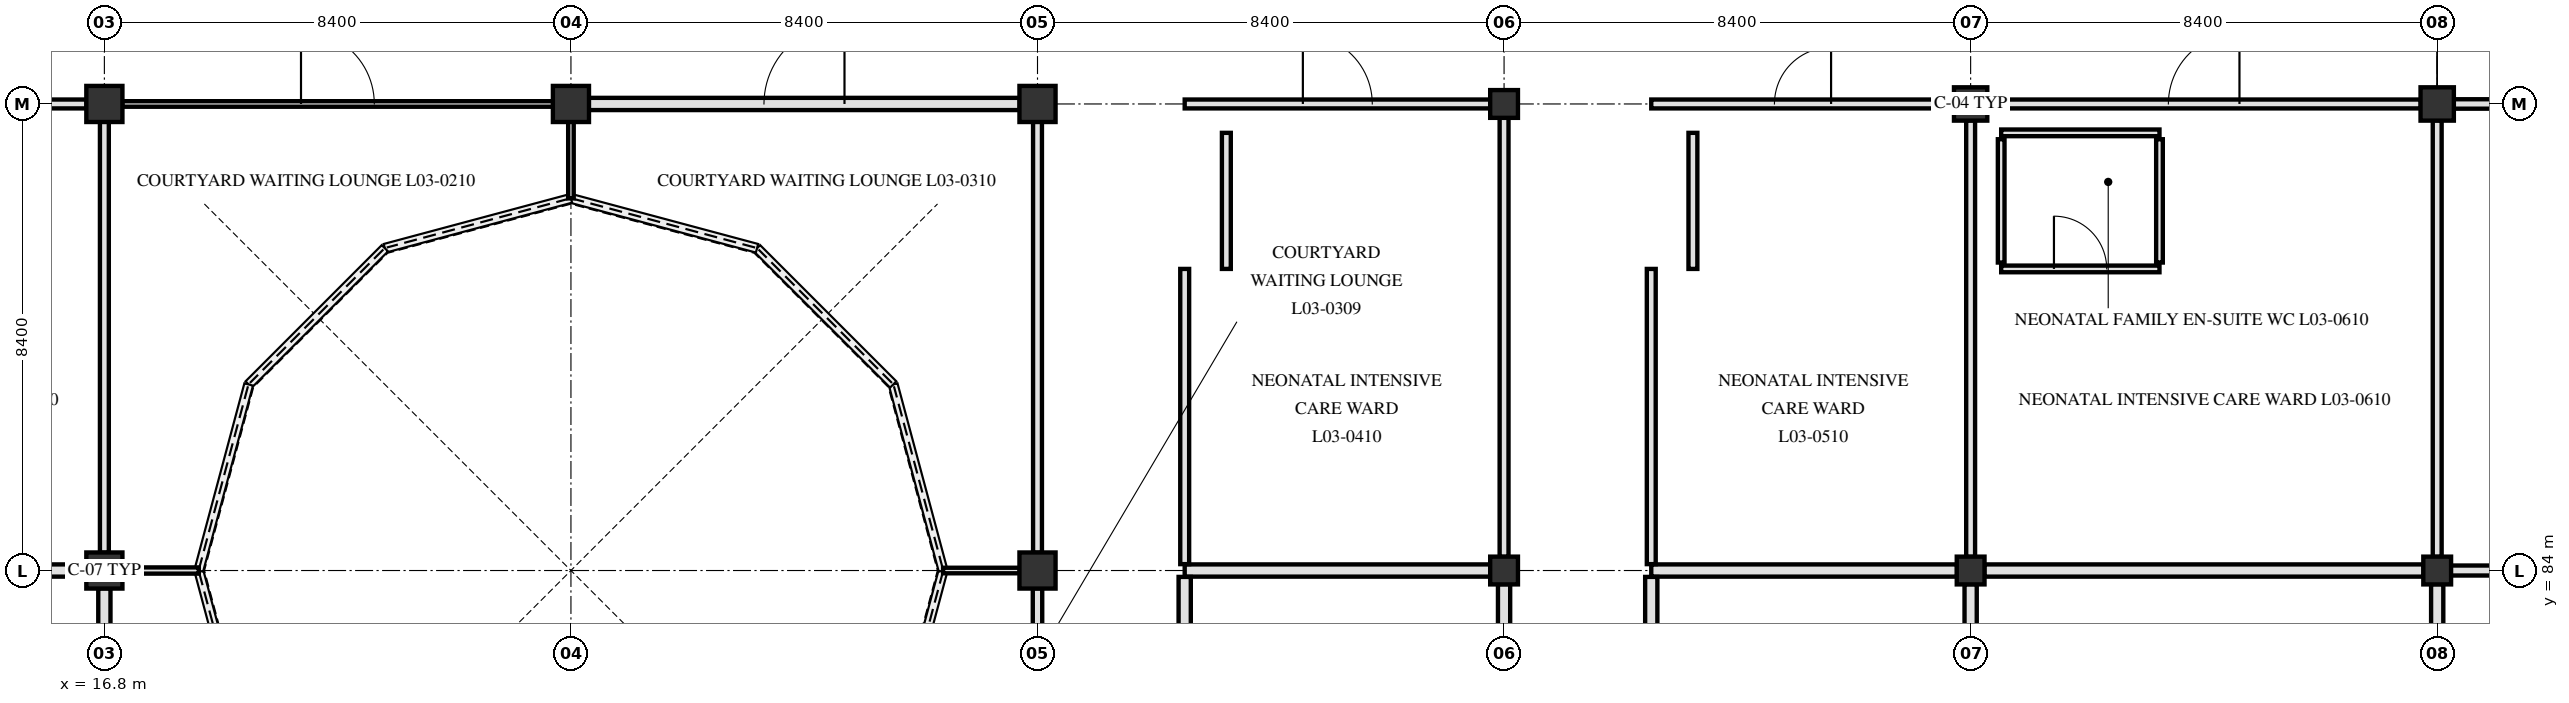
"""IFC4 building model, lengths in metres.
Left out: names, types, materials, properties, quantities, classifications, styles, units other than length and angle.
Written with IfcOpenShell. Run it as: python <this file> out.ifc"""

import sys

from ifc_helpers import new_model, si_unit, direction, frame, frame_2d, origin, origin_2d, place, context, subcontext, project, spatial, rectangle, circle, extrude, element, fill, save


model = new_model("IFC4")
c1 = context("Model", 3, precision=1e-05, world=origin(), true_north=direction((0.0, 1.0)))
c2 = subcontext(c1, "Body", "Model", "MODEL_VIEW")
j1 = project(units=[si_unit("LENGTHUNIT", "METRE"), si_unit("PLANEANGLEUNIT", "RADIAN")], contexts=[c1])
p1 = place(None, origin())
s1 = spatial("IfcSite", under=j1, at=p1, CompositionType="ELEMENT")
p2 = place(p1, origin())
s2 = spatial("IfcBuilding", under=s1, at=p2, CompositionType="ELEMENT")
p3 = place(p2, frame((0.0, 0.0, 14.4)))
s3 = spatial("IfcBuildingStorey", under=s2, at=p3, CompositionType="ELEMENT", Elevation=14.4)
for number, where, z_axis, x_axis in (
    (1, (16.8, 84.0, 0.0), (0.0, 0.0, 1.0), (1.0, 0.0, 0.0)),
    (2, (16.8, 92.4, 0.0), (0.0, 0.0, 1.0), (1.0, 0.0, 0.0)),
    (3, (25.2, 92.4, 0.0), (0.0, 0.0, 1.0), (1.0, 0.0, 0.0)),
    (4, (33.6, 84.0, 0.0), (0.0, 0.0, 1.0), (1.0, 0.0, 0.0)),
    (5, (33.6, 92.4, 0.0), (0.0, 0.0, 1.0), (1.0, 0.0, 0.0)),
):
    element("IfcColumn", number, at=place(p3, frame(where, z_axis=z_axis, x_axis=x_axis)), inside=s3, PredefinedType="COLUMN", context=c2, shape_type="SweptSolid", body=[
        extrude(circle(Radius=0.325, at=origin_2d()), origin(), (0.0, 0.0, 1.0), 4.2),
    ])
for number, where, z_axis, x_axis in (
    (6, (42.0, 84.0, 0.0), (0.0, 0.0, 1.0), (1.0, 0.0, 0.0)),
    (7, (42.0, 92.4, 0.0), (0.0, 0.0, 1.0), (1.0, 0.0, 0.0)),
    (8, (50.4, 84.0, 0.0), (0.0, 0.0, 1.0), (1.0, 0.0, 0.0)),
):
    element("IfcColumn", number, at=place(p3, frame(where, z_axis=z_axis, x_axis=x_axis)), inside=s3, PredefinedType="COLUMN", context=c2, shape_type="SweptSolid", body=[
        extrude(rectangle(XDim=0.5, YDim=0.5, at=origin_2d()), origin(), (0.0, 0.0, 1.0), 4.2),
    ])
p4 = place(p3, frame((50.4, 92.4, 0.0), z_axis=(0.0, 0.0, 1.0), x_axis=(1.0, 0.0, 0.0)))
e9 = element("IfcColumn", 9, at=p4, inside=s3, PredefinedType="COLUMN", context=c2, shape_type="SweptSolid", body=[
    extrude(rectangle(XDim=0.6, YDim=0.6, at=origin_2d()), origin(), (0.0, 0.0, 1.0), 4.2),
])
p5 = place(p3, frame((58.8, 84.0, 0.0), z_axis=(0.0, 0.0, 1.0), x_axis=(1.0, 0.0, 0.0)))
e10 = element("IfcColumn", 10, at=p5, inside=s3, PredefinedType="COLUMN", context=c2, shape_type="SweptSolid", body=[
    extrude(rectangle(XDim=0.5, YDim=0.5, at=origin_2d()), origin(), (0.0, 0.0, 1.0), 4.2),
])
p6 = place(p3, frame((58.8, 92.4, 0.0), z_axis=(0.0, 0.0, 1.0), x_axis=(1.0, 0.0, 0.0)))
e11 = element("IfcColumn", 11, at=p6, inside=s3, PredefinedType="COLUMN", context=c2, shape_type="SweptSolid", body=[
    extrude(rectangle(XDim=0.6, YDim=0.6, at=origin_2d()), origin(), (0.0, 0.0, 1.0), 4.2),
])
p7 = place(p3, frame((8.645, 84.0, 0.0), z_axis=(0.0, 0.0, 1.0), x_axis=(1.0, 0.0, 0.0)))
e12 = element("IfcWall", 12, at=p7, inside=s3, PredefinedType="PARTITIONING", context=c2, shape_type="SweptSolid", body=[
    extrude(rectangle(XDim=7.835, YDim=0.22, at=frame_2d((3.917, 0.0))), origin(), (0.0, 0.0, 1.0), 3.28),
])
p8 = place(p3, frame((17.12, 84.0, 0.0), z_axis=(0.0, 0.0, 1.0), x_axis=(1.0, 0.0, 0.0)))
e13 = element("IfcWall", 13, at=p8, inside=s3, PredefinedType="PARTITIONING", context=c2, shape_type="SweptSolid", body=[
    extrude(rectangle(XDim=1.38, YDim=0.112, at=frame_2d((0.69, 0.0))), origin(), (0.0, 0.0, 1.0), 3.89),
])
p9 = place(p3, frame((31.9, 84.0, 0.0), z_axis=(0.0, 0.0, 1.0), x_axis=(1.0, 0.0, 0.0)))
e14 = element("IfcWall", 14, at=p9, inside=s3, PredefinedType="PARTITIONING", context=c2, shape_type="SweptSolid", body=[
    extrude(rectangle(XDim=1.38, YDim=0.1, at=frame_2d((0.69, 0.0))), origin(), (0.0, 0.0, 1.0), 3.89),
])
p10 = place(p3, frame((36.25, 84.0, 0.0), z_axis=(0.0, 0.0, 1.0), x_axis=(1.0, 0.0, 0.0)))
e15 = element("IfcWall", 15, at=p10, inside=s3, PredefinedType="PARTITIONING", context=c2, shape_type="SweptSolid", body=[
    extrude(rectangle(XDim=5.505, YDim=0.22, at=frame_2d((2.752, 0.0))), origin(), (0.0, 0.0, 1.0), 3.28),
])
p11 = place(p3, frame((44.65, 84.0, 0.0), z_axis=(0.0, 0.0, 1.0), x_axis=(1.0, 0.0, 0.0)))
e16 = element("IfcWall", 16, at=p11, inside=s3, PredefinedType="PARTITIONING", context=c2, shape_type="SweptSolid", body=[
    extrude(rectangle(XDim=5.505, YDim=0.22, at=frame_2d((2.752, 0.0))), origin(), (0.0, 0.0, 1.0), 3.28),
])
p12 = place(p3, frame((50.645, 84.0, 0.0), z_axis=(0.0, 0.0, 1.0), x_axis=(1.0, 0.0, 0.0)))
e17 = element("IfcWall", 17, at=p12, inside=s3, PredefinedType="PARTITIONING", context=c2, shape_type="SweptSolid", body=[
    extrude(rectangle(XDim=7.91, YDim=0.22, at=frame_2d((3.955, 0.0))), origin(), (0.0, 0.0, 1.0), 3.28),
])
p13 = place(p3, frame((59.045, 84.0, 0.0), z_axis=(0.0, 0.0, 1.0), x_axis=(1.0, 0.0, 0.0)))
e18 = element("IfcWall", 18, at=p13, inside=s3, PredefinedType="PARTITIONING", context=c2, shape_type="SweptSolid", body=[
    extrude(rectangle(XDim=7.91, YDim=0.18, at=frame_2d((3.955, 0.0))), origin(), (0.0, 0.0, 1.0), 3.28),
])
p14 = place(p3, frame((50.95, 89.43, 0.0), z_axis=(0.0, 0.0, 1.0), x_axis=(1.0, 0.0, 0.0)))
e19 = element("IfcWall", 19, at=p14, inside=s3, PredefinedType="PARTITIONING", context=c2, shape_type="SweptSolid", body=[
    extrude(rectangle(XDim=2.85, YDim=0.12, at=frame_2d((1.425, 0.0))), origin(), (0.0, 0.0, 1.0), 3.89),
])
p15 = place(p14, frame((0.95, 0.0, 0.0)))
e20 = element("IfcOpeningElement", 20, at=p15, cuts=e19, PredefinedType="OPENING", context=c2, shape_type="SweptSolid", body=[
    extrude(rectangle(XDim=0.95, YDim=2.1, at=frame_2d((0.475, 1.05))), frame((0.0, 0.07, 0.0), z_axis=(0.0, -1.0, 0.0), x_axis=(1.0, 0.0, 0.0)), (0.0, 0.0, 1.0), 0.14),
])
p16 = place(p3, frame((50.95, 91.88, 0.0), z_axis=(0.0, 0.0, 1.0), x_axis=(1.0, 0.0, 0.0)))
e21 = element("IfcWall", 21, at=p16, inside=s3, PredefinedType="PARTITIONING", context=c2, shape_type="SweptSolid", body=[
    extrude(rectangle(XDim=2.85, YDim=0.12, at=frame_2d((1.425, 0.0))), origin(), (0.0, 0.0, 1.0), 3.89),
])
p17 = place(p3, frame((8.645, 92.4, 0.0), z_axis=(0.0, 0.0, 1.0), x_axis=(1.0, 0.0, 0.0)))
e22 = element("IfcWall", 22, at=p17, inside=s3, PredefinedType="PARTITIONING", context=c2, shape_type="SweptSolid", body=[
    extrude(rectangle(XDim=7.835, YDim=0.16, at=frame_2d((3.917, 0.0))), origin(), (0.0, 0.0, 1.0), 3.28),
])
p18 = place(p17, frame((3.317, 0.0, 0.0)))
e23 = element("IfcOpeningElement", 23, at=p18, cuts=e22, PredefinedType="OPENING", context=c2, shape_type="SweptSolid", body=[
    extrude(rectangle(XDim=1.2, YDim=2.15, at=frame_2d((0.6, 1.075))), frame((0.0, 0.09, 0.0), z_axis=(0.0, -1.0, 0.0), x_axis=(1.0, 0.0, 0.0)), (0.0, 0.0, 1.0), 0.18),
])
p19 = place(p3, frame((17.12, 92.4, 0.0), z_axis=(0.0, 0.0, 1.0), x_axis=(1.0, 0.0, 0.0)))
e24 = element("IfcWall", 24, at=p19, inside=s3, PredefinedType="PARTITIONING", context=c2, shape_type="SweptSolid", body=[
    extrude(rectangle(XDim=7.76, YDim=0.1, at=frame_2d((3.88, 0.0))), origin(), (0.0, 0.0, 1.0), 3.28),
])
p20 = place(p19, frame((3.22, 0.0, 0.0)))
e25 = element("IfcOpeningElement", 25, at=p20, cuts=e24, PredefinedType="OPENING", context=c2, shape_type="SweptSolid", body=[
    extrude(rectangle(XDim=1.32, YDim=2.18, at=frame_2d((0.66, 1.09))), frame((0.0, 0.06, 0.0), z_axis=(0.0, -1.0, 0.0), x_axis=(1.0, 0.0, 0.0)), (0.0, 0.0, 1.0), 0.12),
])
p21 = place(p3, frame((25.52, 92.4, 0.0), z_axis=(0.0, 0.0, 1.0), x_axis=(1.0, 0.0, 0.0)))
e26 = element("IfcWall", 26, at=p21, inside=s3, PredefinedType="PARTITIONING", context=c2, shape_type="SweptSolid", body=[
    extrude(rectangle(XDim=7.76, YDim=0.22, at=frame_2d((3.88, 0.0))), origin(), (0.0, 0.0, 1.0), 3.28),
])
p22 = place(p21, frame((3.155, 0.0, 0.0)))
e27 = element("IfcOpeningElement", 27, at=p22, cuts=e26, PredefinedType="OPENING", context=c2, shape_type="SweptSolid", body=[
    extrude(rectangle(XDim=1.45, YDim=2.2, at=frame_2d((0.725, 1.1))), frame((0.0, 0.12, 0.0), z_axis=(0.0, -1.0, 0.0), x_axis=(1.0, 0.0, 0.0)), (0.0, 0.0, 1.0), 0.24),
])
p23 = place(p3, frame((36.25, 92.4, 0.0), z_axis=(0.0, 0.0, 1.0), x_axis=(1.0, 0.0, 0.0)))
e28 = element("IfcWall", 28, at=p23, inside=s3, PredefinedType="PARTITIONING", context=c2, shape_type="SweptSolid", body=[
    extrude(rectangle(XDim=5.505, YDim=0.16, at=frame_2d((2.752, 0.0))), origin(), (0.0, 0.0, 1.0), 3.28),
])
p24 = place(p23, frame((2.127, 0.0, 0.0)))
e29 = element("IfcOpeningElement", 29, at=p24, cuts=e28, PredefinedType="OPENING", context=c2, shape_type="SweptSolid", body=[
    extrude(rectangle(XDim=1.25, YDim=2.2, at=frame_2d((0.625, 1.1))), frame((0.0, 0.09, 0.0), z_axis=(0.0, -1.0, 0.0), x_axis=(1.0, 0.0, 0.0)), (0.0, 0.0, 1.0), 0.18),
])
p25 = place(p3, frame((44.65, 92.4, 0.0), z_axis=(0.0, 0.0, 1.0), x_axis=(1.0, 0.0, 0.0)))
e30 = element("IfcWall", 30, at=p25, inside=s3, PredefinedType="PARTITIONING", context=c2, shape_type="SweptSolid", body=[
    extrude(rectangle(XDim=5.455, YDim=0.16, at=frame_2d((2.728, 0.0))), origin(), (0.0, 0.0, 1.0), 3.28),
])
p26 = place(p25, frame((2.218, 0.0, 0.0)))
e31 = element("IfcOpeningElement", 31, at=p26, cuts=e30, PredefinedType="OPENING", context=c2, shape_type="SweptSolid", body=[
    extrude(rectangle(XDim=1.02, YDim=2.12, at=frame_2d((0.51, 1.06))), frame((0.0, 0.09, 0.0), z_axis=(0.0, -1.0, 0.0), x_axis=(1.0, 0.0, 0.0)), (0.0, 0.0, 1.0), 0.18),
])
p27 = place(p3, frame((50.695, 92.4, 0.0), z_axis=(0.0, 0.0, 1.0), x_axis=(1.0, 0.0, 0.0)))
e32 = element("IfcWall", 32, at=p27, inside=s3, PredefinedType="PARTITIONING", context=c2, shape_type="SweptSolid", body=[
    extrude(rectangle(XDim=7.81, YDim=0.16, at=frame_2d((3.905, 0.0))), origin(), (0.0, 0.0, 1.0), 2.88),
])
p28 = place(p27, frame((3.265, 0.0, 0.0)))
e33 = element("IfcOpeningElement", 33, at=p28, cuts=e32, PredefinedType="OPENING", context=c2, shape_type="SweptSolid", body=[
    extrude(rectangle(XDim=1.28, YDim=2.18, at=frame_2d((0.64, 1.09))), frame((0.0, 0.09, 0.0), z_axis=(0.0, -1.0, 0.0), x_axis=(1.0, 0.0, 0.0)), (0.0, 0.0, 1.0), 0.18),
])
p29 = place(p3, frame((59.095, 92.4, 0.0), z_axis=(0.0, 0.0, 1.0), x_axis=(1.0, 0.0, 0.0)))
e34 = element("IfcWall", 34, at=p29, inside=s3, PredefinedType="PARTITIONING", context=c2, shape_type="SweptSolid", body=[
    extrude(rectangle(XDim=7.76, YDim=0.17, at=frame_2d((3.88, 0.0))), origin(), (0.0, 0.0, 1.0), 2.88),
])
p30 = place(p29, frame((2.98, 0.0, 0.0)))
e35 = element("IfcOpeningElement", 35, at=p30, cuts=e34, PredefinedType="OPENING", context=c2, shape_type="SweptSolid", body=[
    extrude(rectangle(XDim=1.8, YDim=2.25, at=frame_2d((0.9, 1.125))), frame((0.0, 0.095, 0.0), z_axis=(0.0, -1.0, 0.0), x_axis=(1.0, 0.0, 0.0)), (0.0, 0.0, 1.0), 0.19),
])
p31 = place(p3, frame((16.8, 78.315, 0.0), z_axis=(0.0, 0.0, 1.0), x_axis=(0.0, 1.0, 0.0)))
e36 = element("IfcWall", 36, at=p31, inside=s3, PredefinedType="PARTITIONING", context=c2, shape_type="SweptSolid", body=[
    extrude(rectangle(XDim=5.365, YDim=0.22, at=frame_2d((2.683, 0.0))), origin(), (0.0, 0.0, 1.0), 3.33),
])
p32 = place(p3, frame((16.8, 84.32, 0.0), z_axis=(0.0, 0.0, 1.0), x_axis=(0.0, 1.0, 0.0)))
e37 = element("IfcWall", 37, at=p32, inside=s3, PredefinedType="PARTITIONING", context=c2, shape_type="SweptSolid", body=[
    extrude(rectangle(XDim=7.76, YDim=0.16, at=frame_2d((3.88, 0.0))), origin(), (0.0, 0.0, 1.0), 3.33),
])
p33 = place(p3, frame((25.2, 90.7, 0.0), z_axis=(0.0, 0.0, 1.0), x_axis=(0.0, 1.0, 0.0)))
e38 = element("IfcWall", 38, at=p33, inside=s3, PredefinedType="PARTITIONING", context=c2, shape_type="SweptSolid", body=[
    extrude(rectangle(XDim=1.38, YDim=0.1, at=frame_2d((0.69, 0.0))), origin(), (0.0, 0.0, 1.0), 3.89),
])
p34 = place(p3, frame((33.6, 78.315, 0.0), z_axis=(0.0, 0.0, 1.0), x_axis=(0.0, 1.0, 0.0)))
e39 = element("IfcWall", 39, at=p34, inside=s3, PredefinedType="PARTITIONING", context=c2, shape_type="SweptSolid", body=[
    extrude(rectangle(XDim=5.365, YDim=0.17, at=frame_2d((2.683, 0.0))), origin(), (0.0, 0.0, 1.0), 3.33),
])
p35 = place(p3, frame((33.6, 84.32, 0.0), z_axis=(0.0, 0.0, 1.0), x_axis=(0.0, 1.0, 0.0)))
e40 = element("IfcWall", 40, at=p35, inside=s3, PredefinedType="PARTITIONING", context=c2, shape_type="SweptSolid", body=[
    extrude(rectangle(XDim=7.76, YDim=0.16, at=frame_2d((3.88, 0.0))), origin(), (0.0, 0.0, 1.0), 3.33),
])
p36 = place(p3, frame((36.25, 78.315, 0.0), z_axis=(0.0, 0.0, 1.0), x_axis=(0.0, 1.0, 0.0)))
e41 = element("IfcWall", 41, at=p36, inside=s3, PredefinedType="PARTITIONING", context=c2, shape_type="SweptSolid", body=[
    extrude(rectangle(XDim=5.57, YDim=0.22, at=frame_2d((2.785, 0.0))), origin(), (0.0, 0.0, 1.0), 3.28),
])
p37 = place(p3, frame((36.25, 84.115, 0.0), z_axis=(0.0, 0.0, 1.0), x_axis=(0.0, 1.0, 0.0)))
e42 = element("IfcWall", 42, at=p37, inside=s3, PredefinedType="PARTITIONING", context=c2, shape_type="SweptSolid", body=[
    extrude(rectangle(XDim=5.315, YDim=0.16, at=frame_2d((2.657, 0.0))), origin(), (0.0, 0.0, 1.0), 3.28),
])
p38 = place(p3, frame((37.0, 89.43, 0.0), z_axis=(0.0, 0.0, 1.0), x_axis=(0.0, 1.0, 0.0)))
e43 = element("IfcWall", 43, at=p38, inside=s3, PredefinedType="PARTITIONING", context=c2, shape_type="SweptSolid", body=[
    extrude(rectangle(XDim=2.45, YDim=0.16, at=frame_2d((1.225, 0.0))), origin(), (0.0, 0.0, 1.0), 3.89),
])
p39 = place(p3, frame((42.0, 78.315, 0.0), z_axis=(0.0, 0.0, 1.0), x_axis=(0.0, 1.0, 0.0)))
e44 = element("IfcWall", 44, at=p39, inside=s3, PredefinedType="PARTITIONING", context=c2, shape_type="SweptSolid", body=[
    extrude(rectangle(XDim=5.44, YDim=0.22, at=frame_2d((2.72, 0.0))), origin(), (0.0, 0.0, 1.0), 3.33),
])
p40 = place(p3, frame((42.0, 84.245, 0.0), z_axis=(0.0, 0.0, 1.0), x_axis=(0.0, 1.0, 0.0)))
e45 = element("IfcWall", 45, at=p40, inside=s3, PredefinedType="PARTITIONING", context=c2, shape_type="SweptSolid", body=[
    extrude(rectangle(XDim=7.91, YDim=0.16, at=frame_2d((3.955, 0.0))), origin(), (0.0, 0.0, 1.0), 3.33),
])
p41 = place(p3, frame((44.65, 78.315, 0.0), z_axis=(0.0, 0.0, 1.0), x_axis=(0.0, 1.0, 0.0)))
e46 = element("IfcWall", 46, at=p41, inside=s3, PredefinedType="PARTITIONING", context=c2, shape_type="SweptSolid", body=[
    extrude(rectangle(XDim=5.57, YDim=0.22, at=frame_2d((2.785, 0.0))), origin(), (0.0, 0.0, 1.0), 3.28),
])
p42 = place(p3, frame((44.65, 84.115, 0.0), z_axis=(0.0, 0.0, 1.0), x_axis=(0.0, 1.0, 0.0)))
e47 = element("IfcWall", 47, at=p42, inside=s3, PredefinedType="PARTITIONING", context=c2, shape_type="SweptSolid", body=[
    extrude(rectangle(XDim=5.315, YDim=0.16, at=frame_2d((2.657, 0.0))), origin(), (0.0, 0.0, 1.0), 3.28),
])
p43 = place(p3, frame((45.4, 89.43, 0.0), z_axis=(0.0, 0.0, 1.0), x_axis=(0.0, 1.0, 0.0)))
e48 = element("IfcWall", 48, at=p43, inside=s3, PredefinedType="PARTITIONING", context=c2, shape_type="SweptSolid", body=[
    extrude(rectangle(XDim=2.45, YDim=0.16, at=frame_2d((1.225, 0.0))), origin(), (0.0, 0.0, 1.0), 3.89),
])
p44 = place(p3, frame((50.4, 78.315, 0.0), z_axis=(0.0, 0.0, 1.0), x_axis=(0.0, 1.0, 0.0)))
e49 = element("IfcWall", 49, at=p44, inside=s3, PredefinedType="PARTITIONING", context=c2, shape_type="SweptSolid", body=[
    extrude(rectangle(XDim=5.44, YDim=0.22, at=frame_2d((2.72, 0.0))), origin(), (0.0, 0.0, 1.0), 2.88),
])
p45 = place(p3, frame((50.4, 84.245, 0.0), z_axis=(0.0, 0.0, 1.0), x_axis=(0.0, 1.0, 0.0)))
e50 = element("IfcWall", 50, at=p45, inside=s3, PredefinedType="PARTITIONING", context=c2, shape_type="SweptSolid", body=[
    extrude(rectangle(XDim=7.86, YDim=0.16, at=frame_2d((3.93, 0.0))), origin(), (0.0, 0.0, 1.0), 2.88),
])
for number, where, z_axis, x_axis in (
    (51, (50.95, 89.545, 0.0), (0.0, 0.0, 1.0), (0.0, 1.0, 0.0)),
    (52, (53.8, 89.545, 0.0), (0.0, 0.0, 1.0), (0.0, 1.0, 0.0)),
):
    element("IfcWall", number, at=place(p3, frame(where, z_axis=z_axis, x_axis=x_axis)), inside=s3, PredefinedType="PARTITIONING", context=c2, shape_type="SweptSolid", body=[
        extrude(rectangle(XDim=2.22, YDim=0.12, at=frame_2d((1.11, 0.0))), origin(), (0.0, 0.0, 1.0), 3.89),
    ])
p46 = place(p3, frame((58.8, 78.315, 0.0), z_axis=(0.0, 0.0, 1.0), x_axis=(0.0, 1.0, 0.0)))
e53 = element("IfcWall", 53, at=p46, inside=s3, PredefinedType="PARTITIONING", context=c2, shape_type="SweptSolid", body=[
    extrude(rectangle(XDim=5.44, YDim=0.22, at=frame_2d((2.72, 0.0))), origin(), (0.0, 0.0, 1.0), 3.33),
])
p47 = place(p3, frame((58.8, 84.245, 0.0), z_axis=(0.0, 0.0, 1.0), x_axis=(0.0, 1.0, 0.0)))
e54 = element("IfcWall", 54, at=p47, inside=s3, PredefinedType="PARTITIONING", context=c2, shape_type="SweptSolid", body=[
    extrude(rectangle(XDim=7.86, YDim=0.16, at=frame_2d((3.93, 0.0))), origin(), (0.0, 0.0, 1.0), 3.33),
])
p48 = place(p20, origin())
e55 = element("IfcDoor", 55, at=p48, inside=s3, OperationType="SINGLE_SWING_LEFT", PredefinedType="DOOR", context=c2, shape_type="SweptSolid", body=[
    extrude(rectangle(XDim=1.32, YDim=2.18, at=frame_2d((0.66, 1.09))), frame((0.0, 0.025, 0.0), z_axis=(0.0, -1.0, 0.0), x_axis=(1.0, 0.0, 0.0)), (0.0, 0.0, 1.0), 0.05),
])
fill(e25, e55)
p49 = place(p22, origin())
e56 = element("IfcDoor", 56, at=p49, inside=s3, OperationType="SINGLE_SWING_RIGHT", PredefinedType="DOOR", context=c2, shape_type="SweptSolid", body=[
    extrude(rectangle(XDim=1.45, YDim=2.2, at=frame_2d((0.725, 1.1))), frame((0.0, 0.025, 0.0), z_axis=(0.0, -1.0, 0.0), x_axis=(1.0, 0.0, 0.0)), (0.0, 0.0, 1.0), 0.05),
])
fill(e27, e56)
p50 = place(p24, origin())
e57 = element("IfcDoor", 57, at=p50, inside=s3, OperationType="SINGLE_SWING_LEFT", PredefinedType="DOOR", context=c2, shape_type="SweptSolid", body=[
    extrude(rectangle(XDim=1.25, YDim=2.2, at=frame_2d((0.625, 1.1))), frame((0.0, 0.025, 0.0), z_axis=(0.0, -1.0, 0.0), x_axis=(1.0, 0.0, 0.0)), (0.0, 0.0, 1.0), 0.05),
])
fill(e29, e57)
p51 = place(p26, origin())
e58 = element("IfcDoor", 58, at=p51, inside=s3, OperationType="SINGLE_SWING_RIGHT", PredefinedType="DOOR", context=c2, shape_type="SweptSolid", body=[
    extrude(rectangle(XDim=1.02, YDim=2.12, at=frame_2d((0.51, 1.06))), frame((0.0, 0.025, 0.0), z_axis=(0.0, -1.0, 0.0), x_axis=(1.0, 0.0, 0.0)), (0.0, 0.0, 1.0), 0.05),
])
fill(e31, e58)
p52 = place(p28, origin())
e59 = element("IfcDoor", 59, at=p52, inside=s3, OperationType="SINGLE_SWING_RIGHT", PredefinedType="DOOR", context=c2, shape_type="SweptSolid", body=[
    extrude(rectangle(XDim=1.28, YDim=2.18, at=frame_2d((0.64, 1.09))), frame((0.0, 0.025, 0.0), z_axis=(0.0, -1.0, 0.0), x_axis=(1.0, 0.0, 0.0)), (0.0, 0.0, 1.0), 0.05),
])
fill(e33, e59)
p53 = place(p15, origin())
e60 = element("IfcDoor", 60, at=p53, inside=s3, OperationType="SINGLE_SWING_LEFT", PredefinedType="DOOR", context=c2, shape_type="SweptSolid", body=[
    extrude(rectangle(XDim=0.95, YDim=2.1, at=frame_2d((0.475, 1.05))), frame((0.0, 0.025, 0.0), z_axis=(0.0, -1.0, 0.0), x_axis=(1.0, 0.0, 0.0)), (0.0, 0.0, 1.0), 0.05),
])
fill(e20, e60)
save(model, sys.argv[1])
